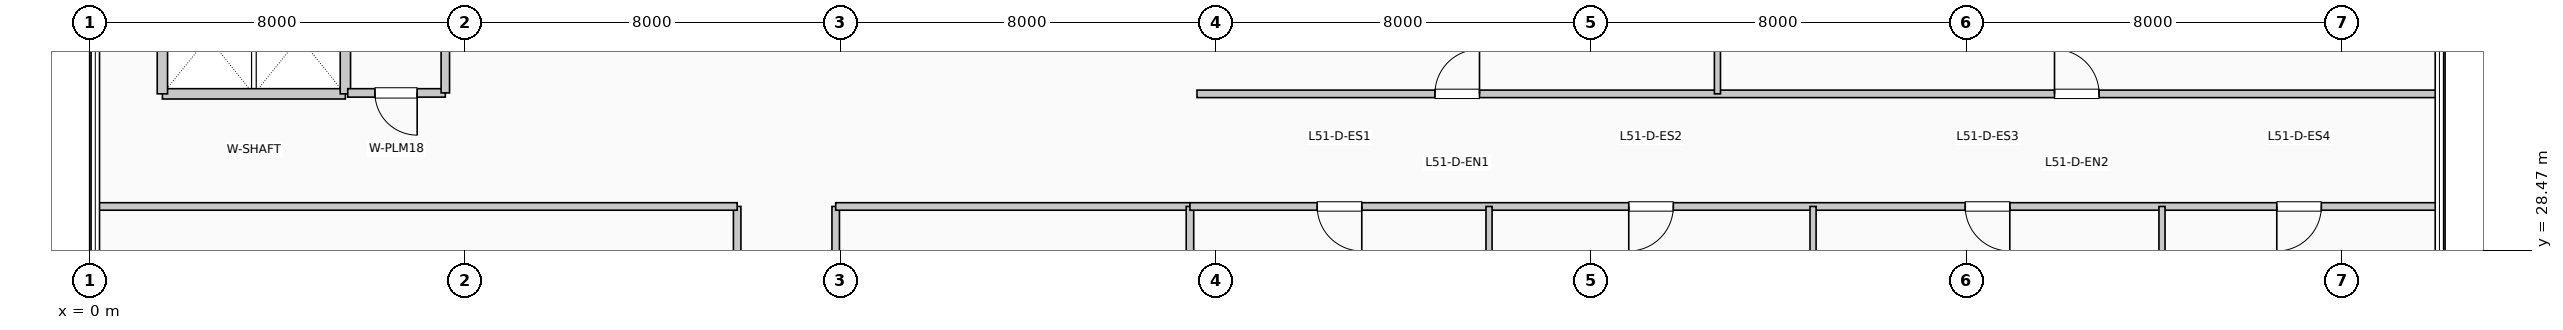
"""IFC4 building model, lengths in metres.
Left out: names, types, materials, properties, quantities, classifications, styles, units other than length and angle.
Written with IfcOpenShell. Run it as: python <this file> out.ifc"""

import sys

from ifc_helpers import new_model, si_unit, direction, frame, frame_2d, origin, place, context, subcontext, project, spatial, rectangle, extrude, element, fill, save


model = new_model("IFC4")
c1 = context("Model", 3, precision=1e-05, world=origin(), true_north=direction((0.0, 1.0)))
c2 = subcontext(c1, "Body", "Model", "MODEL_VIEW")
j1 = project(units=[si_unit("LENGTHUNIT", "METRE"), si_unit("PLANEANGLEUNIT", "RADIAN")], contexts=[c1])
p1 = place(None, origin())
s1 = spatial("IfcSite", under=j1, at=p1, CompositionType="ELEMENT")
p2 = place(p1, origin())
s2 = spatial("IfcBuilding", under=s1, at=p2, CompositionType="ELEMENT")
p3 = place(p2, frame((0.0, 0.0, 211.2)))
s3 = spatial("IfcBuildingStorey", under=s2, at=p3, CompositionType="ELEMENT", Elevation=211.2)
p4 = place(p3, frame((1.55, 31.8, 0.0), z_axis=(0.0, 0.0, 1.0), x_axis=(1.0, 0.0, 0.0)))
e1 = element("IfcWall", 1, at=p4, inside=s3, PredefinedType="PARTITIONING", context=c2, shape_type="SweptSolid", body=[
    extrude(rectangle(XDim=3.9, YDim=0.22, at=frame_2d((1.95, 0.0))), origin(), (0.0, 0.0, 1.0), 3.71),
])
for number, where, z_axis, x_axis in (
    (2, (1.55, 31.8, 0.0), (0.0, 0.0, 1.0), (0.0, 1.0, 0.0)),
    (3, (5.45, 31.8, 0.0), (0.0, 0.0, 1.0), (0.0, 1.0, 0.0)),
):
    element("IfcWall", number, at=place(p3, frame(where, z_axis=z_axis, x_axis=x_axis)), inside=s3, PredefinedType="PARTITIONING", context=c2, shape_type="SweptSolid", body=[
        extrude(rectangle(XDim=2.38, YDim=0.22, at=frame_2d((1.19, 0.0))), origin(), (0.0, 0.0, 1.0), 3.71),
    ])
p5 = place(p3, frame((5.5, 31.82, 0.0), z_axis=(0.0, 0.0, 1.0), x_axis=(1.0, 0.0, 0.0)))
e4 = element("IfcWall", 4, at=p5, inside=s3, PredefinedType="PLUMBINGWALL", context=c2, shape_type="SweptSolid", body=[
    extrude(rectangle(XDim=2.08, YDim=0.18, at=frame_2d((1.04, 0.0))), origin(), (0.0, 0.0, 1.0), 3.71),
])
p6 = place(p5, frame((1.48, 0.0, 0.0), z_axis=(0.0, 0.0, 1.0), x_axis=(-1.0, 0.0, 0.0)))
e5 = element("IfcOpeningElement", 5, at=p6, cuts=e4, PredefinedType="OPENING", context=c2, shape_type="SweptSolid", body=[
    extrude(rectangle(XDim=0.9, YDim=2.1, at=frame_2d((0.45, 1.05))), frame((0.0, 0.1, 0.0), z_axis=(0.0, -1.0, 0.0), x_axis=(1.0, 0.0, 0.0)), (0.0, 0.0, 1.0), 0.2),
])
p7 = place(p3, frame((7.58, 31.82, 0.0), z_axis=(0.0, 0.0, 1.0), x_axis=(0.0, 1.0, 0.0)))
e6 = element("IfcWall", 6, at=p7, inside=s3, PredefinedType="PLUMBINGWALL", context=c2, shape_type="SweptSolid", body=[
    extrude(rectangle(XDim=2.36, YDim=0.18, at=frame_2d((1.18, 0.0))), origin(), (0.0, 0.0, 1.0), 3.71),
])
p8 = place(p3, frame((13.8, 11.04, 0.0), z_axis=(0.0, 0.0, 1.0), x_axis=(0.0, 1.0, 0.0)))
e7 = element("IfcWall", 7, at=p8, inside=s3, PredefinedType="PARTITIONING", context=c2, shape_type="SweptSolid", body=[
    extrude(rectangle(XDim=18.36, YDim=0.16, at=frame_2d((9.18, 0.0))), origin(), (0.0, 0.0, 1.0), 3.71),
])
p9 = place(p8, frame((2.495, 0.0, 0.0), z_axis=(0.0, 0.0, 1.0), x_axis=(-1.0, 0.0, 0.0)))
e8 = element("IfcOpeningElement", 8, at=p9, cuts=e7, PredefinedType="OPENING", context=c2, shape_type="SweptSolid", body=[
    extrude(rectangle(XDim=0.95, YDim=2.15, at=frame_2d((0.475, 1.075))), frame((0.0, 0.09, 0.0), z_axis=(0.0, -1.0, 0.0), x_axis=(1.0, 0.0, 0.0)), (0.0, 0.0, 1.0), 0.18),
])
p10 = place(p8, frame((7.084, 0.0, 0.0), z_axis=(0.0, 0.0, 1.0), x_axis=(-1.0, 0.0, 0.0)))
e9 = element("IfcOpeningElement", 9, at=p10, cuts=e7, PredefinedType="OPENING", context=c2, shape_type="SweptSolid", body=[
    extrude(rectangle(XDim=0.95, YDim=2.15, at=frame_2d((0.475, 1.075))), frame((0.0, 0.09, 0.0), z_axis=(0.0, -1.0, 0.0), x_axis=(1.0, 0.0, 0.0)), (0.0, 0.0, 1.0), 0.18),
])
p11 = place(p8, frame((12.042, 0.0, 0.0), z_axis=(0.0, 0.0, 1.0), x_axis=(-1.0, 0.0, 0.0)))
e10 = element("IfcOpeningElement", 10, at=p11, cuts=e7, PredefinedType="OPENING", context=c2, shape_type="SweptSolid", body=[
    extrude(rectangle(XDim=0.95, YDim=2.15, at=frame_2d((0.475, 1.075))), frame((0.0, 0.09, 0.0), z_axis=(0.0, -1.0, 0.0), x_axis=(1.0, 0.0, 0.0)), (0.0, 0.0, 1.0), 0.18),
])
p12 = place(p8, frame((16.632, 0.0, 0.0), z_axis=(0.0, 0.0, 1.0), x_axis=(-1.0, 0.0, 0.0)))
e11 = element("IfcOpeningElement", 11, at=p12, cuts=e7, PredefinedType="OPENING", context=c2, shape_type="SweptSolid", body=[
    extrude(rectangle(XDim=0.95, YDim=2.15, at=frame_2d((0.475, 1.075))), frame((0.0, 0.09, 0.0), z_axis=(0.0, -1.0, 0.0), x_axis=(1.0, 0.0, 0.0)), (0.0, 0.0, 1.0), 0.18),
])
p13 = place(p3, frame((15.9, 11.04, 0.0), z_axis=(0.0, 0.0, 1.0), x_axis=(0.0, 1.0, 0.0)))
e12 = element("IfcWall", 12, at=p13, inside=s3, PredefinedType="PARTITIONING", context=c2, shape_type="SweptSolid", body=[
    extrude(rectangle(XDim=18.36, YDim=0.16, at=frame_2d((9.18, 0.0))), origin(), (0.0, 0.0, 1.0), 3.71),
])
p14 = place(p13, frame((2.83, 0.0, 0.0)))
e13 = element("IfcOpeningElement", 13, at=p14, cuts=e12, PredefinedType="OPENING", context=c2, shape_type="SweptSolid", body=[
    extrude(rectangle(XDim=0.95, YDim=2.15, at=frame_2d((0.475, 1.075))), frame((0.0, 0.09, 0.0), z_axis=(0.0, -1.0, 0.0), x_axis=(1.0, 0.0, 0.0)), (0.0, 0.0, 1.0), 0.18),
])
p15 = place(p13, frame((9.256, 0.0, 0.0)))
e14 = element("IfcOpeningElement", 14, at=p15, cuts=e12, PredefinedType="OPENING", context=c2, shape_type="SweptSolid", body=[
    extrude(rectangle(XDim=0.95, YDim=2.15, at=frame_2d((0.475, 1.075))), frame((0.0, 0.09, 0.0), z_axis=(0.0, -1.0, 0.0), x_axis=(1.0, 0.0, 0.0)), (0.0, 0.0, 1.0), 0.18),
])
p16 = place(p13, frame((15.131, 0.0, 0.0)))
e15 = element("IfcOpeningElement", 15, at=p16, cuts=e12, PredefinedType="OPENING", context=c2, shape_type="SweptSolid", body=[
    extrude(rectangle(XDim=0.95, YDim=2.15, at=frame_2d((0.475, 1.075))), frame((0.0, 0.09, 0.0), z_axis=(0.0, -1.0, 0.0), x_axis=(1.0, 0.0, 0.0)), (0.0, 0.0, 1.0), 0.18),
])
p17 = place(p3, frame((0.19, 29.4, 0.0), z_axis=(0.0, 0.0, 1.0), x_axis=(1.0, 0.0, 0.0)))
e16 = element("IfcWall", 16, at=p17, inside=s3, PredefinedType="PARTITIONING", context=c2, shape_type="SweptSolid", body=[
    extrude(rectangle(XDim=13.61, YDim=0.16, at=frame_2d((6.805, 0.0))), origin(), (0.0, 0.0, 1.0), 3.365),
])
p18 = place(p3, frame((15.9, 29.4, 0.0), z_axis=(0.0, 0.0, 1.0), x_axis=(1.0, 0.0, 0.0)))
e17 = element("IfcWall", 17, at=p18, inside=s3, PredefinedType="PARTITIONING", context=c2, shape_type="SweptSolid", body=[
    extrude(rectangle(XDim=7.55, YDim=0.16, at=frame_2d((3.775, 0.0))), origin(), (0.0, 0.0, 1.0), 3.365),
])
p19 = place(p3, frame((23.45, 6.84, 0.0), z_axis=(0.0, 0.0, 1.0), x_axis=(0.0, 1.0, 0.0)))
e18 = element("IfcWall", 18, at=p19, inside=s3, PredefinedType="PARTITIONING", context=c2, shape_type="SweptSolid", body=[
    extrude(rectangle(XDim=22.56, YDim=0.16, at=frame_2d((11.28, 0.0))), origin(), (0.0, 0.0, 1.0), 3.095),
])
p20 = place(p3, frame((23.45, 29.4, 0.0), z_axis=(0.0, 0.0, 1.0), x_axis=(1.0, 0.0, 0.0)))
e19 = element("IfcWall", 19, at=p20, inside=s3, PredefinedType="PARTITIONING", context=c2, shape_type="SweptSolid", body=[
    extrude(rectangle(XDim=26.56, YDim=0.16, at=frame_2d((13.28, 0.0))), origin(), (0.0, 0.0, 1.0), 3.335),
])
p21 = place(p20, frame((3.662, 0.0, 0.0), z_axis=(0.0, 0.0, 1.0), x_axis=(-1.0, 0.0, 0.0)))
e20 = element("IfcOpeningElement", 20, at=p21, cuts=e19, PredefinedType="OPENING", context=c2, shape_type="SweptSolid", body=[
    extrude(rectangle(XDim=0.95, YDim=2.15, at=frame_2d((0.475, 1.075))), frame((0.0, 0.09, 0.0), z_axis=(0.0, -1.0, 0.0), x_axis=(1.0, 0.0, 0.0)), (0.0, 0.0, 1.0), 0.18),
])
p22 = place(p20, frame((10.302, 0.0, 0.0), z_axis=(0.0, 0.0, 1.0), x_axis=(-1.0, 0.0, 0.0)))
e21 = element("IfcOpeningElement", 21, at=p22, cuts=e19, PredefinedType="OPENING", context=c2, shape_type="SweptSolid", body=[
    extrude(rectangle(XDim=0.95, YDim=2.15, at=frame_2d((0.475, 1.075))), frame((0.0, 0.09, 0.0), z_axis=(0.0, -1.0, 0.0), x_axis=(1.0, 0.0, 0.0)), (0.0, 0.0, 1.0), 0.18),
])
p23 = place(p20, frame((17.473, 0.0, 0.0), z_axis=(0.0, 0.0, 1.0), x_axis=(-1.0, 0.0, 0.0)))
e22 = element("IfcOpeningElement", 22, at=p23, cuts=e19, PredefinedType="OPENING", context=c2, shape_type="SweptSolid", body=[
    extrude(rectangle(XDim=0.95, YDim=2.15, at=frame_2d((0.475, 1.075))), frame((0.0, 0.09, 0.0), z_axis=(0.0, -1.0, 0.0), x_axis=(1.0, 0.0, 0.0)), (0.0, 0.0, 1.0), 0.18),
])
p24 = place(p20, frame((24.113, 0.0, 0.0), z_axis=(0.0, 0.0, 1.0), x_axis=(-1.0, 0.0, 0.0)))
e23 = element("IfcOpeningElement", 23, at=p24, cuts=e19, PredefinedType="OPENING", context=c2, shape_type="SweptSolid", body=[
    extrude(rectangle(XDim=0.95, YDim=2.15, at=frame_2d((0.475, 1.075))), frame((0.0, 0.09, 0.0), z_axis=(0.0, -1.0, 0.0), x_axis=(1.0, 0.0, 0.0)), (0.0, 0.0, 1.0), 0.18),
])
p25 = place(p3, frame((23.6, 31.8, 0.0), z_axis=(0.0, 0.0, 1.0), x_axis=(1.0, 0.0, 0.0)))
e24 = element("IfcWall", 24, at=p25, inside=s3, PredefinedType="PARTITIONING", context=c2, shape_type="SweptSolid", body=[
    extrude(rectangle(XDim=26.41, YDim=0.16, at=frame_2d((13.205, 0.0))), origin(), (0.0, 0.0, 1.0), 3.71),
])
p26 = place(p25, frame((5.071, 0.0, 0.0)))
e25 = element("IfcOpeningElement", 25, at=p26, cuts=e24, PredefinedType="OPENING", context=c2, shape_type="SweptSolid", body=[
    extrude(rectangle(XDim=0.95, YDim=2.15, at=frame_2d((0.475, 1.075))), frame((0.0, 0.09, 0.0), z_axis=(0.0, -1.0, 0.0), x_axis=(1.0, 0.0, 0.0)), (0.0, 0.0, 1.0), 0.18),
])
p27 = place(p25, frame((18.276, 0.0, 0.0)))
e26 = element("IfcOpeningElement", 26, at=p27, cuts=e24, PredefinedType="OPENING", context=c2, shape_type="SweptSolid", body=[
    extrude(rectangle(XDim=0.95, YDim=2.15, at=frame_2d((0.475, 1.075))), frame((0.0, 0.09, 0.0), z_axis=(0.0, -1.0, 0.0), x_axis=(1.0, 0.0, 0.0)), (0.0, 0.0, 1.0), 0.18),
])
for number, where, z_axis, x_axis in (
    (27, (29.824, 22.19, 0.0), (0.0, 0.0, 1.0), (0.0, 1.0, 0.0)),
    (28, (36.73, 22.19, 0.0), (0.0, 0.0, 1.0), (0.0, 1.0, 0.0)),
    (29, (44.167, 22.19, 0.0), (0.0, 0.0, 1.0), (0.0, 1.0, 0.0)),
):
    element("IfcWall", number, at=place(p3, frame(where, z_axis=z_axis, x_axis=x_axis)), inside=s3, PredefinedType="PARTITIONING", context=c2, shape_type="SweptSolid", body=[
        extrude(rectangle(XDim=7.21, YDim=0.13, at=frame_2d((3.605, 0.0))), origin(), (0.0, 0.0, 1.0), 3.71),
    ])
p28 = place(p3, frame((34.692, 31.8, 0.0), z_axis=(0.0, 0.0, 1.0), x_axis=(0.0, 1.0, 0.0)))
e30 = element("IfcWall", 30, at=p28, inside=s3, PredefinedType="PARTITIONING", context=c2, shape_type="SweptSolid", body=[
    extrude(rectangle(XDim=14.01, YDim=0.13, at=frame_2d((7.005, 0.0))), origin(), (0.0, 0.0, 1.0), 3.71),
])
p29 = place(p6, origin())
e31 = element("IfcDoor", 31, at=p29, inside=s3, OperationType="SINGLE_SWING_RIGHT", PredefinedType="DOOR", context=c2, shape_type="SweptSolid", body=[
    extrude(rectangle(XDim=0.9, YDim=2.1, at=frame_2d((0.45, 1.05))), frame((0.0, 0.025, 0.0), z_axis=(0.0, -1.0, 0.0), x_axis=(1.0, 0.0, 0.0)), (0.0, 0.0, 1.0), 0.05),
])
fill(e5, e31)
p30 = place(p21, origin())
e32 = element("IfcDoor", 32, at=p30, inside=s3, OperationType="SINGLE_SWING_RIGHT", PredefinedType="DOOR", context=c2, shape_type="SweptSolid", body=[
    extrude(rectangle(XDim=0.95, YDim=2.15, at=frame_2d((0.475, 1.075))), frame((0.0, 0.025, 0.0), z_axis=(0.0, -1.0, 0.0), x_axis=(1.0, 0.0, 0.0)), (0.0, 0.0, 1.0), 0.05),
])
fill(e20, e32)
p31 = place(p22, origin())
e33 = element("IfcDoor", 33, at=p31, inside=s3, OperationType="SINGLE_SWING_LEFT", PredefinedType="DOOR", context=c2, shape_type="SweptSolid", body=[
    extrude(rectangle(XDim=0.95, YDim=2.15, at=frame_2d((0.475, 1.075))), frame((0.0, 0.025, 0.0), z_axis=(0.0, -1.0, 0.0), x_axis=(1.0, 0.0, 0.0)), (0.0, 0.0, 1.0), 0.05),
])
fill(e21, e33)
p32 = place(p23, origin())
e34 = element("IfcDoor", 34, at=p32, inside=s3, OperationType="SINGLE_SWING_RIGHT", PredefinedType="DOOR", context=c2, shape_type="SweptSolid", body=[
    extrude(rectangle(XDim=0.95, YDim=2.15, at=frame_2d((0.475, 1.075))), frame((0.0, 0.025, 0.0), z_axis=(0.0, -1.0, 0.0), x_axis=(1.0, 0.0, 0.0)), (0.0, 0.0, 1.0), 0.05),
])
fill(e22, e34)
p33 = place(p24, origin())
e35 = element("IfcDoor", 35, at=p33, inside=s3, OperationType="SINGLE_SWING_LEFT", PredefinedType="DOOR", context=c2, shape_type="SweptSolid", body=[
    extrude(rectangle(XDim=0.95, YDim=2.15, at=frame_2d((0.475, 1.075))), frame((0.0, 0.025, 0.0), z_axis=(0.0, -1.0, 0.0), x_axis=(1.0, 0.0, 0.0)), (0.0, 0.0, 1.0), 0.05),
])
fill(e23, e35)
p34 = place(p26, origin())
e36 = element("IfcDoor", 36, at=p34, inside=s3, OperationType="SINGLE_SWING_RIGHT", PredefinedType="DOOR", context=c2, shape_type="SweptSolid", body=[
    extrude(rectangle(XDim=0.95, YDim=2.15, at=frame_2d((0.475, 1.075))), frame((0.0, 0.025, 0.0), z_axis=(0.0, -1.0, 0.0), x_axis=(1.0, 0.0, 0.0)), (0.0, 0.0, 1.0), 0.05),
])
fill(e25, e36)
p35 = place(p27, origin())
e37 = element("IfcDoor", 37, at=p35, inside=s3, OperationType="SINGLE_SWING_LEFT", PredefinedType="DOOR", context=c2, shape_type="SweptSolid", body=[
    extrude(rectangle(XDim=0.95, YDim=2.15, at=frame_2d((0.475, 1.075))), frame((0.0, 0.025, 0.0), z_axis=(0.0, -1.0, 0.0), x_axis=(1.0, 0.0, 0.0)), (0.0, 0.0, 1.0), 0.05),
])
fill(e26, e37)
save(model, sys.argv[1])
